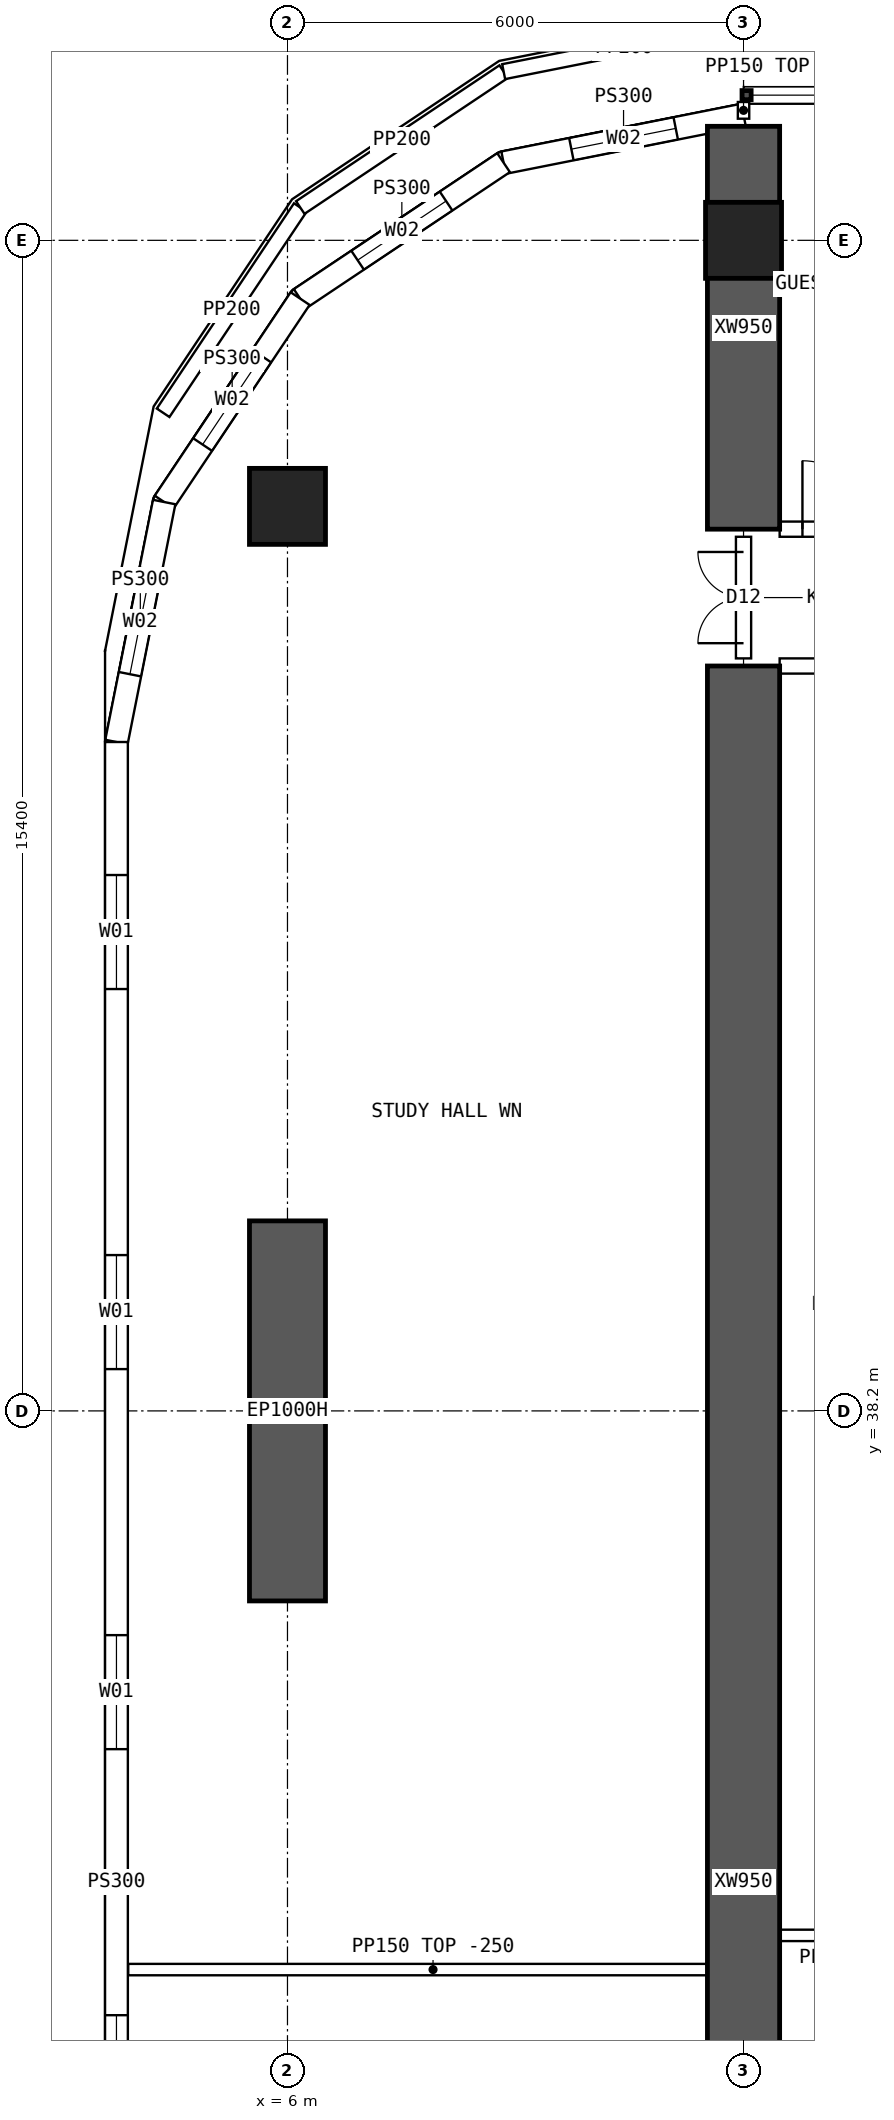
"""IFC4 building model, lengths in metres.
Left out: names, types, materials, properties, quantities, classifications, styles, units other than length and angle.
Written with IfcOpenShell. Run it as: python <this file> out.ifc"""

import sys

from ifc_helpers import new_model, si_unit, direction, frame, frame_2d, origin, origin_2d, place, context, subcontext, project, spatial, polyline, rectangle, hollow_rectangle, outline, extrude, element, fill, save


model = new_model("IFC4")
c1 = context("Model", 3, precision=1e-05, world=origin(), true_north=direction((0.0, 1.0)))
c2 = subcontext(c1, "Body", "Model", "MODEL_VIEW")
j1 = project(units=[si_unit("LENGTHUNIT", "METRE"), si_unit("PLANEANGLEUNIT", "RADIAN")], contexts=[c1])
p1 = place(None, origin())
s1 = spatial("IfcSite", under=j1, at=p1, CompositionType="ELEMENT")
p2 = place(p1, origin())
s2 = spatial("IfcBuilding", under=s1, at=p2, CompositionType="ELEMENT")
p3 = place(p2, frame((0.0, 0.0, 76.15)))
s3 = spatial("IfcBuildingStorey", under=s2, at=p3, CompositionType="ELEMENT", Elevation=76.15)
for number, where, z_axis, x_axis in (
    (1, (12.0, 53.6, 0.0), (0.0, 0.0, 1.0), (1.0, 0.0, 0.0)),
    (2, (6.0, 50.1, 0.0), (0.0, 0.0, 1.0), (1.0, 0.0, 0.0)),
):
    element("IfcColumn", number, at=place(p3, frame(where, z_axis=z_axis, x_axis=x_axis)), inside=s3, PredefinedType="COLUMN", context=c2, shape_type="SweptSolid", body=[
        extrude(hollow_rectangle(XDim=1.0, YDim=1.0, WallThickness=0.1, at=origin_2d()), origin(), (0.0, 0.0, 1.0), 4.5),
    ])
p4 = place(p3, frame((6.0, 35.7, 0.0), z_axis=(0.0, 0.0, 1.0), x_axis=(0.0, 1.0, 0.0)))
e3 = element("IfcWall", 3, at=p4, inside=s3, PredefinedType="SHEAR", context=c2, shape_type="SweptSolid", body=[
    extrude(rectangle(XDim=5.0, YDim=1.0, at=frame_2d((2.5, 0.0))), origin(), (0.0, 0.0, 1.0), 4.5),
])
p5 = place(p3, frame((12.0, 49.8, 0.0), z_axis=(0.0, 0.0, 1.0), x_axis=(0.0, 1.0, 0.0)))
e4 = element("IfcWall", 4, at=p5, inside=s3, PredefinedType="SHEAR", context=c2, shape_type="SweptSolid", body=[
    extrude(rectangle(XDim=5.3, YDim=0.95, at=frame_2d((2.65, 0.0))), origin(), (0.0, 0.0, 1.0), 4.5),
])
p6 = place(p3, frame((12.0, 16.0, 0.0), z_axis=(0.0, 0.0, 1.0), x_axis=(0.0, 1.0, 0.0)))
e5 = element("IfcWall", 5, at=p6, inside=s3, PredefinedType="SHEAR", context=c2, shape_type="SweptSolid", body=[
    extrude(rectangle(XDim=32.0, YDim=0.95, at=frame_2d((16.0, 0.0))), origin(), (0.0, 0.0, 1.0), 4.5),
])
p7 = place(p3, frame((3.75, 47.0, 0.0), z_axis=(0.0, 0.0, 1.0), x_axis=(0.0, -1.0, 0.0)))
e6 = element("IfcWall", 6, at=p7, inside=s3, PredefinedType="SOLIDWALL", context=c2, shape_type="SweptSolid", body=[
    extrude(outline(polyline([(-0.015, -0.15), (30.015, -0.15), (29.985, 0.15), (0.015, 0.15), (-0.015, -0.15)])), origin(), (0.0, 0.0, 1.0), 4.25),
])
p8 = place(p7, frame((1.75, 0.0, 0.9)))
e7 = element("IfcOpeningElement", 7, at=p8, cuts=e6, PredefinedType="OPENING", context=c2, shape_type="SweptSolid", body=[
    extrude(rectangle(XDim=1.5, YDim=2.0, at=frame_2d((0.75, 1.0))), frame((0.0, 0.16, 0.0), z_axis=(0.0, -1.0, 0.0), x_axis=(1.0, 0.0, 0.0)), (0.0, 0.0, 1.0), 0.32),
])
p9 = place(p7, frame((6.75, 0.0, 0.9)))
e8 = element("IfcOpeningElement", 8, at=p9, cuts=e6, PredefinedType="OPENING", context=c2, shape_type="SweptSolid", body=[
    extrude(rectangle(XDim=1.5, YDim=2.0, at=frame_2d((0.75, 1.0))), frame((0.0, 0.16, 0.0), z_axis=(0.0, -1.0, 0.0), x_axis=(1.0, 0.0, 0.0)), (0.0, 0.0, 1.0), 0.32),
])
p10 = place(p7, frame((11.75, 0.0, 0.9)))
e9 = element("IfcOpeningElement", 9, at=p10, cuts=e6, PredefinedType="OPENING", context=c2, shape_type="SweptSolid", body=[
    extrude(rectangle(XDim=1.5, YDim=2.0, at=frame_2d((0.75, 1.0))), frame((0.0, 0.16, 0.0), z_axis=(0.0, -1.0, 0.0), x_axis=(1.0, 0.0, 0.0)), (0.0, 0.0, 1.0), 0.32),
])
p11 = place(p7, frame((16.75, 0.0, 0.9)))
e10 = element("IfcOpeningElement", 10, at=p11, cuts=e6, PredefinedType="OPENING", context=c2, shape_type="SweptSolid", body=[
    extrude(rectangle(XDim=1.5, YDim=2.0, at=frame_2d((0.75, 1.0))), frame((0.0, 0.16, 0.0), z_axis=(0.0, -1.0, 0.0), x_axis=(1.0, 0.0, 0.0)), (0.0, 0.0, 1.0), 0.32),
])
p12 = place(p7, frame((21.75, 0.0, 0.9)))
e11 = element("IfcOpeningElement", 11, at=p12, cuts=e6, PredefinedType="OPENING", context=c2, shape_type="SweptSolid", body=[
    extrude(rectangle(XDim=1.5, YDim=2.0, at=frame_2d((0.75, 1.0))), frame((0.0, 0.16, 0.0), z_axis=(0.0, -1.0, 0.0), x_axis=(1.0, 0.0, 0.0)), (0.0, 0.0, 1.0), 0.32),
])
p13 = place(p7, frame((26.75, 0.0, 0.9)))
e12 = element("IfcOpeningElement", 12, at=p13, cuts=e6, PredefinedType="OPENING", context=c2, shape_type="SweptSolid", body=[
    extrude(rectangle(XDim=1.5, YDim=2.0, at=frame_2d((0.75, 1.0))), frame((0.0, 0.16, 0.0), z_axis=(0.0, -1.0, 0.0), x_axis=(1.0, 0.0, 0.0)), (0.0, 0.0, 1.0), 0.32),
])
p14 = place(p3, frame((12.0, 55.25, 0.0), z_axis=(0.0, 0.0, 1.0), x_axis=(-0.980787251524, -0.195080412259, 0.0)))
e13 = element("IfcWall", 13, at=p14, inside=s3, PredefinedType="SOLIDWALL", context=c2, shape_type="SweptSolid", body=[
    extrude(outline(polyline([(-0.03, -0.15), (3.249, -0.15), (3.189, 0.15), (0.03, 0.15), (-0.03, -0.15)])), origin(), (0.0, 0.0, 1.0), 4.25),
])
p15 = place(p14, frame((0.909, 0.0, 0.9)))
e14 = element("IfcOpeningElement", 14, at=p15, cuts=e13, PredefinedType="OPENING", context=c2, shape_type="SweptSolid", body=[
    extrude(rectangle(XDim=1.4, YDim=1.8, at=frame_2d((0.7, 0.9))), frame((0.0, 0.16, 0.0), z_axis=(0.0, -1.0, 0.0), x_axis=(1.0, 0.0, 0.0)), (0.0, 0.0, 1.0), 0.32),
])
p16 = place(p3, frame((8.843, 54.622, 0.0), z_axis=(0.0, 0.0, 1.0), x_axis=(-0.831443069936, -0.555609954424, 0.0)))
e15 = element("IfcWall", 15, at=p16, inside=s3, PredefinedType="SOLIDWALL", context=c2, shape_type="SweptSolid", body=[
    extrude(outline(polyline([(-0.03, -0.15), (3.249, -0.15), (3.189, 0.15), (0.03, 0.15), (-0.03, -0.15)])), origin(), (0.0, 0.0, 1.0), 4.25),
])
p17 = place(p16, frame((0.909, 0.0, 0.9)))
e16 = element("IfcOpeningElement", 16, at=p17, cuts=e15, PredefinedType="OPENING", context=c2, shape_type="SweptSolid", body=[
    extrude(rectangle(XDim=1.4, YDim=1.8, at=frame_2d((0.7, 0.9))), frame((0.0, 0.16, 0.0), z_axis=(0.0, -1.0, 0.0), x_axis=(1.0, 0.0, 0.0)), (0.0, 0.0, 1.0), 0.32),
])
p18 = place(p3, frame((6.167, 52.833, 0.0), z_axis=(0.0, 0.0, 1.0), x_axis=(-0.555609954424, -0.831443069936, 0.0)))
e17 = element("IfcWall", 17, at=p18, inside=s3, PredefinedType="SOLIDWALL", context=c2, shape_type="SweptSolid", body=[
    extrude(outline(polyline([(-0.03, -0.15), (3.249, -0.15), (3.189, 0.15), (0.03, 0.15), (-0.03, -0.15)])), origin(), (0.0, 0.0, 1.0), 4.25),
])
p19 = place(p18, frame((0.909, 0.0, 0.9)))
e18 = element("IfcOpeningElement", 18, at=p19, cuts=e17, PredefinedType="OPENING", context=c2, shape_type="SweptSolid", body=[
    extrude(rectangle(XDim=1.4, YDim=1.8, at=frame_2d((0.7, 0.9))), frame((0.0, 0.16, 0.0), z_axis=(0.0, -1.0, 0.0), x_axis=(1.0, 0.0, 0.0)), (0.0, 0.0, 1.0), 0.32),
])
p20 = place(p3, frame((4.378, 50.157, 0.0), z_axis=(0.0, 0.0, 1.0), x_axis=(-0.195080412259, -0.980787251524, 0.0)))
e19 = element("IfcWall", 19, at=p20, inside=s3, PredefinedType="SOLIDWALL", context=c2, shape_type="SweptSolid", body=[
    extrude(outline(polyline([(-0.03, -0.15), (3.234, -0.15), (3.204, 0.15), (0.03, 0.15), (-0.03, -0.15)])), origin(), (0.0, 0.0, 1.0), 4.25),
])
p21 = place(p20, frame((0.909, 0.0, 0.9)))
e20 = element("IfcOpeningElement", 20, at=p21, cuts=e19, PredefinedType="OPENING", context=c2, shape_type="SweptSolid", body=[
    extrude(rectangle(XDim=1.4, YDim=1.8, at=frame_2d((0.7, 0.9))), frame((0.0, 0.16, 0.0), z_axis=(0.0, -1.0, 0.0), x_axis=(1.0, 0.0, 0.0)), (0.0, 0.0, 1.0), 0.32),
])
p22 = place(p3, frame((4.364, 51.331, 0.0), z_axis=(0.0, 0.0, 1.0), x_axis=(0.555584580696, 0.831460025312, 0.0)))
e21 = element("IfcWall", 21, at=p22, inside=s3, PredefinedType="PARAPET", context=c2, shape_type="SweptSolid", body=[
    extrude(rectangle(XDim=3.248, YDim=0.2, at=frame_2d((1.624, 0.0))), origin(), (0.0, 0.0, 1.0), 1.1),
])
p23 = place(p3, frame((6.168, 54.031, 0.0), z_axis=(0.0, 0.0, 1.0), x_axis=(0.831454530953, 0.555592803191, 0.0)))
e22 = element("IfcWall", 22, at=p23, inside=s3, PredefinedType="PARAPET", context=c2, shape_type="SweptSolid", body=[
    extrude(rectangle(XDim=3.218, YDim=0.2, at=frame_2d((1.609, 0.0))), origin(), (0.0, 0.0, 1.0), 1.1),
])
p24 = place(p3, frame((8.844, 55.819, 0.0), z_axis=(0.0, 0.0, 1.0), x_axis=(0.980792126237, 0.195055902531, 0.0)))
e23 = element("IfcWall", 23, at=p24, inside=s3, PredefinedType="PARAPET", context=c2, shape_type="SweptSolid", body=[
    extrude(rectangle(XDim=3.233, YDim=0.2, at=frame_2d((1.616, 0.0))), origin(), (0.0, 0.0, 1.0), 1.1),
])
p25 = place(p3, frame((12.475, 49.8, 0.0), z_axis=(0.0, 0.0, 1.0), x_axis=(1.0, 0.0, 0.0)))
e24 = element("IfcWall", 24, at=p25, inside=s3, PredefinedType="SOLIDWALL", context=c2, shape_type="SweptSolid", body=[
    extrude(outline(polyline([(0.0, 0.0), (5.05, 0.0), (5.05, 3.85), (0.0, 3.85), (0.0, 0.0)])), frame((0.0, 0.1, 0.0), z_axis=(0.0, -1.0, 0.0), x_axis=(1.0, 0.0, 0.0)), (0.0, 0.0, 1.0), 0.2),
])
p26 = place(p25, frame((0.3, 0.0, 0.0)))
e25 = element("IfcOpeningElement", 25, at=p26, cuts=e24, PredefinedType="OPENING", context=c2, shape_type="SweptSolid", body=[
    extrude(rectangle(XDim=0.9, YDim=2.1, at=frame_2d((0.45, 1.05))), frame((0.0, 0.11, 0.0), z_axis=(0.0, -1.0, 0.0), x_axis=(1.0, 0.0, 0.0)), (0.0, 0.0, 1.0), 0.22),
])
p27 = place(p3, frame((12.475, 48.0, 0.0), z_axis=(0.0, 0.0, 1.0), x_axis=(1.0, 0.0, 0.0)))
e26 = element("IfcWall", 26, at=p27, inside=s3, PredefinedType="SOLIDWALL", context=c2, shape_type="SweptSolid", body=[
    extrude(rectangle(XDim=5.05, YDim=0.2, at=frame_2d((2.525, 0.0))), origin(), (0.0, 0.0, 1.0), 4.25),
])
p28 = place(p27, frame((3.325, 0.0, 0.0)))
e27 = element("IfcOpeningElement", 27, at=p28, cuts=e26, PredefinedType="OPENING", context=c2, shape_type="SweptSolid", body=[
    extrude(rectangle(XDim=1.6, YDim=2.1, at=frame_2d((0.8, 1.05))), frame((0.0, 0.11, 0.0), z_axis=(0.0, -1.0, 0.0), x_axis=(1.0, 0.0, 0.0)), (0.0, 0.0, 1.0), 0.22),
])
p29 = place(p3, frame((12.0, 31.3, 0.0), z_axis=(0.0, 0.0, 1.0), x_axis=(1.0, 0.0, 0.0)))
e28 = element("IfcWall", 28, at=p29, inside=s3, PredefinedType="PARTITIONING", context=c2, shape_type="SweptSolid", body=[
    extrude(rectangle(XDim=3.6, YDim=0.15, at=frame_2d((1.8, 0.0))), origin(), (0.0, 0.0, 1.0), 4.25),
])
p30 = place(p3, frame((3.905, 30.85, 0.0), z_axis=(0.0, 0.0, 1.0), x_axis=(1.0, 0.0, 0.0)))
e29 = element("IfcWall", 29, at=p30, inside=s3, PredefinedType="PARTITIONING", context=c2, shape_type="SweptSolid", body=[
    extrude(outline(polyline([(0.0, 0.0), (8.02, 0.0), (8.02, 4.25), (2.397, 4.25), (2.395, 3.8), (1.797, 3.8), (1.795, 4.25), (0.0, 4.25), (0.0, 0.0)])), frame((0.0, 0.075, 0.0), z_axis=(0.0, -1.0, 0.0), x_axis=(1.0, 0.0, 0.0)), (0.0, 0.0, 1.0), 0.15),
])
p31 = place(p3, frame((12.0, 48.1, 0.0), z_axis=(0.0, 0.0, 1.0), x_axis=(0.0, 1.0, 0.0)))
e30 = element("IfcWall", 30, at=p31, inside=s3, PredefinedType="SOLIDWALL", context=c2, shape_type="SweptSolid", body=[
    extrude(outline(polyline([(0.0, 0.0), (1.6, 0.0), (1.6, 3.85), (0.0, 3.85), (0.0, 0.0)])), frame((0.0, 0.1, 0.0), z_axis=(0.0, -1.0, 0.0), x_axis=(1.0, 0.0, 0.0)), (0.0, 0.0, 1.0), 0.2),
])
p32 = place(p31, frame((0.2, 0.0, 0.0)))
e31 = element("IfcOpeningElement", 31, at=p32, cuts=e30, PredefinedType="OPENING", context=c2, shape_type="SweptSolid", body=[
    extrude(rectangle(XDim=1.2, YDim=2.1, at=frame_2d((0.6, 1.05))), frame((0.0, 0.11, 0.0), z_axis=(0.0, -1.0, 0.0), x_axis=(1.0, 0.0, 0.0)), (0.0, 0.0, 1.0), 0.22),
])
p33 = place(p3, frame((12.0, 55.2, 0.0), z_axis=(0.0, 0.0, 1.0), x_axis=(0.0, 1.0, 0.0)))
e32 = element("IfcWall", 32, at=p33, inside=s3, PredefinedType="PARTITIONING", context=c2, shape_type="SweptSolid", body=[
    extrude(rectangle(XDim=0.22, YDim=0.15, at=frame_2d((0.11, 0.0))), origin(), (0.0, 0.0, 1.0), 4.25),
])
p34 = place(p8, origin())
e33 = element("IfcWindow", 33, at=p34, inside=s3, PartitioningType="SINGLE_PANEL", PredefinedType="WINDOW", context=c2, shape_type="SweptSolid", body=[
    extrude(rectangle(XDim=1.5, YDim=2.0, at=frame_2d((0.75, 1.0))), frame((0.0, 0.03, 0.0), z_axis=(0.0, -1.0, 0.0), x_axis=(1.0, 0.0, 0.0)), (0.0, 0.0, 1.0), 0.06),
])
fill(e7, e33)
p35 = place(p9, origin())
e34 = element("IfcWindow", 34, at=p35, inside=s3, PartitioningType="SINGLE_PANEL", PredefinedType="WINDOW", context=c2, shape_type="SweptSolid", body=[
    extrude(rectangle(XDim=1.5, YDim=2.0, at=frame_2d((0.75, 1.0))), frame((0.0, 0.03, 0.0), z_axis=(0.0, -1.0, 0.0), x_axis=(1.0, 0.0, 0.0)), (0.0, 0.0, 1.0), 0.06),
])
fill(e8, e34)
p36 = place(p10, origin())
e35 = element("IfcWindow", 35, at=p36, inside=s3, PartitioningType="SINGLE_PANEL", PredefinedType="WINDOW", context=c2, shape_type="SweptSolid", body=[
    extrude(rectangle(XDim=1.5, YDim=2.0, at=frame_2d((0.75, 1.0))), frame((0.0, 0.03, 0.0), z_axis=(0.0, -1.0, 0.0), x_axis=(1.0, 0.0, 0.0)), (0.0, 0.0, 1.0), 0.06),
])
fill(e9, e35)
p37 = place(p11, origin())
e36 = element("IfcWindow", 36, at=p37, inside=s3, PartitioningType="SINGLE_PANEL", PredefinedType="WINDOW", context=c2, shape_type="SweptSolid", body=[
    extrude(rectangle(XDim=1.5, YDim=2.0, at=frame_2d((0.75, 1.0))), frame((0.0, 0.03, 0.0), z_axis=(0.0, -1.0, 0.0), x_axis=(1.0, 0.0, 0.0)), (0.0, 0.0, 1.0), 0.06),
])
fill(e10, e36)
p38 = place(p15, origin())
e37 = element("IfcWindow", 37, at=p38, inside=s3, PartitioningType="SINGLE_PANEL", PredefinedType="WINDOW", context=c2, shape_type="SweptSolid", body=[
    extrude(rectangle(XDim=1.4, YDim=1.8, at=frame_2d((0.7, 0.9))), frame((0.0, 0.03, 0.0), z_axis=(0.0, -1.0, 0.0), x_axis=(1.0, 0.0, 0.0)), (0.0, 0.0, 1.0), 0.06),
])
fill(e14, e37)
p39 = place(p17, origin())
e38 = element("IfcWindow", 38, at=p39, inside=s3, PartitioningType="SINGLE_PANEL", PredefinedType="WINDOW", context=c2, shape_type="SweptSolid", body=[
    extrude(rectangle(XDim=1.4, YDim=1.8, at=frame_2d((0.7, 0.9))), frame((0.0, 0.03, 0.0), z_axis=(0.0, -1.0, 0.0), x_axis=(1.0, 0.0, 0.0)), (0.0, 0.0, 1.0), 0.06),
])
fill(e16, e38)
p40 = place(p19, origin())
e39 = element("IfcWindow", 39, at=p40, inside=s3, PartitioningType="SINGLE_PANEL", PredefinedType="WINDOW", context=c2, shape_type="SweptSolid", body=[
    extrude(rectangle(XDim=1.4, YDim=1.8, at=frame_2d((0.7, 0.9))), frame((0.0, 0.03, 0.0), z_axis=(0.0, -1.0, 0.0), x_axis=(1.0, 0.0, 0.0)), (0.0, 0.0, 1.0), 0.06),
])
fill(e18, e39)
p41 = place(p21, origin())
e40 = element("IfcWindow", 40, at=p41, inside=s3, PartitioningType="SINGLE_PANEL", PredefinedType="WINDOW", context=c2, shape_type="SweptSolid", body=[
    extrude(rectangle(XDim=1.4, YDim=1.8, at=frame_2d((0.7, 0.9))), frame((0.0, 0.03, 0.0), z_axis=(0.0, -1.0, 0.0), x_axis=(1.0, 0.0, 0.0)), (0.0, 0.0, 1.0), 0.06),
])
fill(e20, e40)
p42 = place(p26, origin())
e41 = element("IfcDoor", 41, at=p42, inside=s3, OperationType="SINGLE_SWING_LEFT", PredefinedType="DOOR", context=c2, shape_type="SweptSolid", body=[
    extrude(rectangle(XDim=0.9, YDim=2.1, at=frame_2d((0.45, 1.05))), frame((0.0, 0.025, 0.0), z_axis=(0.0, -1.0, 0.0), x_axis=(1.0, 0.0, 0.0)), (0.0, 0.0, 1.0), 0.05),
])
fill(e25, e41)
p43 = place(p32, origin())
e42 = element("IfcDoor", 42, at=p43, inside=s3, OperationType="DOUBLE_DOOR_SINGLE_SWING", PredefinedType="DOOR", context=c2, shape_type="SweptSolid", body=[
    extrude(rectangle(XDim=1.2, YDim=2.1, at=frame_2d((0.6, 1.05))), frame((0.0, 0.025, 0.0), z_axis=(0.0, -1.0, 0.0), x_axis=(1.0, 0.0, 0.0)), (0.0, 0.0, 1.0), 0.05),
])
fill(e31, e42)
save(model, sys.argv[1])
